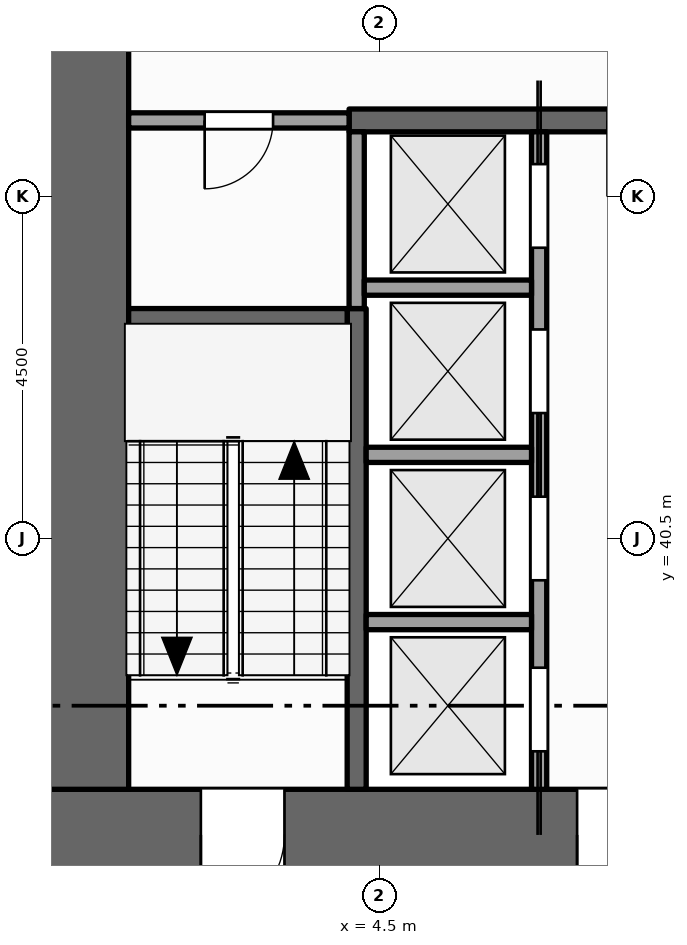
"""IFC4 building model, lengths in metres.
Left out: names, types, materials, properties, quantities, classifications, styles, units other than length and angle.
Written with IfcOpenShell. Run it as: python <this file> out.ifc"""

import sys

from ifc_helpers import new_model, si_unit, direction, frame, frame_2d, origin, place, context, subcontext, project, spatial, rectangle, extrude, element, fill, save


model = new_model("IFC4")
c1 = context("Model", 3, precision=1e-05, world=origin(), true_north=direction((0.0, 1.0)))
c2 = subcontext(c1, "Body", "Model", "MODEL_VIEW")
j1 = project(units=[si_unit("LENGTHUNIT", "METRE"), si_unit("PLANEANGLEUNIT", "RADIAN")], contexts=[c1])
p1 = place(None, origin())
s1 = spatial("IfcSite", under=j1, at=p1, CompositionType="ELEMENT")
p2 = place(p1, origin())
s2 = spatial("IfcBuilding", under=s1, at=p2, CompositionType="ELEMENT")
p3 = place(p2, frame((0.0, 0.0, 61.0)))
s3 = spatial("IfcBuildingStorey", under=s2, at=p3, CompositionType="ELEMENT", Elevation=61.0)
p4 = place(p3, frame((0.0, 36.6, -0.15), z_axis=(0.0, 0.0, 1.0), x_axis=(1.0, 0.0, 0.0)))
e1 = element("IfcWall", 1, at=p4, inside=s3, PredefinedType="SHEAR", context=c2, shape_type="SweptSolid", body=[
    extrude(rectangle(XDim=22.5, YDim=1.2, at=frame_2d((11.25, 0.0))), origin(), (0.0, 0.0, 1.0), 4.0),
])
p5 = place(p4, frame((7.1, 0.0, 0.15)))
e2 = element("IfcOpeningElement", 2, at=p5, cuts=e1, PredefinedType="OPENING", context=c2, shape_type="SweptSolid", body=[
    extrude(rectangle(XDim=1.8, YDim=2.1, at=frame_2d((0.9, 1.05))), frame((0.0, 0.61, 0.0), z_axis=(0.0, -1.0, 0.0), x_axis=(1.0, 0.0, 0.0)), (0.0, 0.0, 1.0), 1.22),
])
p6 = place(p4, frame((13.15, 0.0, 0.15)))
e3 = element("IfcOpeningElement", 3, at=p6, cuts=e1, PredefinedType="OPENING", context=c2, shape_type="SweptSolid", body=[
    extrude(rectangle(XDim=1.1, YDim=2.1, at=frame_2d((0.55, 1.05))), frame((0.0, 0.61, 0.0), z_axis=(0.0, -1.0, 0.0), x_axis=(1.0, 0.0, 0.0)), (0.0, 0.0, 1.0), 1.22),
])
p7 = place(p4, frame((2.15, 0.0, 0.15)))
e4 = element("IfcOpeningElement", 4, at=p7, cuts=e1, PredefinedType="OPENING", context=c2, shape_type="SweptSolid", body=[
    extrude(rectangle(XDim=1.1, YDim=2.1, at=frame_2d((0.55, 1.05))), frame((0.0, 0.61, 0.0), z_axis=(0.0, -1.0, 0.0), x_axis=(1.0, 0.0, 0.0)), (0.0, 0.0, 1.0), 1.22),
])
p8 = place(p4, frame((19.35, 0.0, 0.15)))
e5 = element("IfcOpeningElement", 5, at=p8, cuts=e1, PredefinedType="OPENING", context=c2, shape_type="SweptSolid", body=[
    extrude(rectangle(XDim=1.1, YDim=2.1, at=frame_2d((0.55, 1.05))), frame((0.0, 0.61, 0.0), z_axis=(0.0, -1.0, 0.0), x_axis=(1.0, 0.0, 0.0)), (0.0, 0.0, 1.0), 1.22),
])
p9 = place(p3, frame((0.6, 37.2, -0.15), z_axis=(0.0, 0.0, 1.0), x_axis=(0.0, 1.0, 0.0)))
e6 = element("IfcWall", 6, at=p9, inside=s3, PredefinedType="SHEAR", context=c2, shape_type="SweptSolid", body=[
    extrude(rectangle(XDim=11.1, YDim=1.2, at=frame_2d((5.55, 0.0))), origin(), (0.0, 0.0, 1.0), 4.0),
])
p10 = place(p3, frame((4.2, 37.2, 0.0), z_axis=(0.0, 0.0, 1.0), x_axis=(0.0, 1.0, 0.0)))
e7 = element("IfcWall", 7, at=p10, inside=s3, PredefinedType="SHEAR", context=c2, shape_type="SweptSolid", body=[
    extrude(rectangle(XDim=6.325, YDim=0.25, at=frame_2d((3.163, 0.0))), origin(), (0.0, 0.0, 1.0), 3.85),
])
p11 = place(p3, frame((4.2, 43.525, 0.0), z_axis=(0.0, 0.0, 1.0), x_axis=(0.0, 1.0, 0.0)))
e8 = element("IfcWall", 8, at=p11, inside=s3, PredefinedType="SOLIDWALL", context=c2, shape_type="SweptSolid", body=[
    extrude(rectangle(XDim=2.325, YDim=0.2, at=frame_2d((1.163, 0.0))), origin(), (0.0, 0.0, 1.0), 3.85),
])
p12 = place(p3, frame((6.6, 37.2, 0.0), z_axis=(0.0, 0.0, 1.0), x_axis=(0.0, 1.0, 0.0)))
e9 = element("IfcWall", 9, at=p12, inside=s3, PredefinedType="SOLIDWALL", context=c2, shape_type="SweptSolid", body=[
    extrude(rectangle(XDim=8.65, YDim=0.2, at=frame_2d((4.325, 0.0))), origin(), (0.0, 0.0, 1.0), 3.85),
])
p13 = place(p12, frame((0.5, 0.0, 0.012)))
e10 = element("IfcOpeningElement", 10, at=p13, cuts=e9, PredefinedType="OPENING", context=c2, shape_type="SweptSolid", body=[
    extrude(rectangle(XDim=1.1, YDim=2.1, at=frame_2d((0.55, 1.05))), frame((0.0, 0.11, 0.0), z_axis=(0.0, -1.0, 0.0), x_axis=(1.0, 0.0, 0.0)), (0.0, 0.0, 1.0), 0.22),
])
p14 = place(p12, frame((2.75, 0.0, 0.012)))
e11 = element("IfcOpeningElement", 11, at=p14, cuts=e9, PredefinedType="OPENING", context=c2, shape_type="SweptSolid", body=[
    extrude(rectangle(XDim=1.1, YDim=2.1, at=frame_2d((0.55, 1.05))), frame((0.0, 0.11, 0.0), z_axis=(0.0, -1.0, 0.0), x_axis=(1.0, 0.0, 0.0)), (0.0, 0.0, 1.0), 0.22),
])
p15 = place(p12, frame((4.95, 0.0, 0.012)))
e12 = element("IfcOpeningElement", 12, at=p15, cuts=e9, PredefinedType="OPENING", context=c2, shape_type="SweptSolid", body=[
    extrude(rectangle(XDim=1.1, YDim=2.1, at=frame_2d((0.55, 1.05))), frame((0.0, 0.11, 0.0), z_axis=(0.0, -1.0, 0.0), x_axis=(1.0, 0.0, 0.0)), (0.0, 0.0, 1.0), 0.22),
])
p16 = place(p12, frame((7.125, 0.0, 0.012)))
e13 = element("IfcOpeningElement", 13, at=p16, cuts=e9, PredefinedType="OPENING", context=c2, shape_type="SweptSolid", body=[
    extrude(rectangle(XDim=1.1, YDim=2.1, at=frame_2d((0.55, 1.05))), frame((0.0, 0.11, 0.0), z_axis=(0.0, -1.0, 0.0), x_axis=(1.0, 0.0, 0.0)), (0.0, 0.0, 1.0), 0.22),
])
for number, where, z_axis, x_axis in (
    (14, (4.325, 39.4, 0.0), (0.0, 0.0, 1.0), (1.0, 0.0, 0.0)),
    (15, (4.325, 41.6, 0.0), (0.0, 0.0, 1.0), (1.0, 0.0, 0.0)),
):
    element("IfcWall", number, at=place(p3, frame(where, z_axis=z_axis, x_axis=x_axis)), inside=s3, PredefinedType="SOLIDWALL", context=c2, shape_type="SweptSolid", body=[
        extrude(rectangle(XDim=2.175, YDim=0.2, at=frame_2d((1.087, 0.0))), origin(), (0.0, 0.0, 1.0), 3.85),
    ])
p17 = place(p3, frame((1.2, 43.4, 0.0), z_axis=(0.0, 0.0, 1.0), x_axis=(1.0, 0.0, 0.0)))
e16 = element("IfcWall", 16, at=p17, inside=s3, PredefinedType="SHEAR", context=c2, shape_type="SweptSolid", body=[
    extrude(rectangle(XDim=2.875, YDim=0.25, at=frame_2d((1.438, 0.0))), origin(), (0.0, 0.0, 1.0), 3.85),
])
p18 = place(p3, frame((4.3, 43.8, 0.0), z_axis=(0.0, 0.0, 1.0), x_axis=(1.0, 0.0, 0.0)))
e17 = element("IfcWall", 17, at=p18, inside=s3, PredefinedType="SOLIDWALL", context=c2, shape_type="SweptSolid", body=[
    extrude(rectangle(XDim=2.2, YDim=0.2, at=frame_2d((1.1, 0.0))), origin(), (0.0, 0.0, 1.0), 3.85),
])
p19 = place(p3, frame((1.2, 46.0, 0.0), z_axis=(0.0, 0.0, 1.0), x_axis=(1.0, 0.0, 0.0)))
e18 = element("IfcWall", 18, at=p19, inside=s3, PredefinedType="PARTITIONING", context=c2, shape_type="SweptSolid", body=[
    extrude(rectangle(XDim=2.9, YDim=0.2, at=frame_2d((1.45, 0.0))), origin(), (0.0, 0.0, 1.0), 3.85),
])
p20 = place(p19, frame((1.0, 0.0, 0.0)))
e19 = element("IfcOpeningElement", 19, at=p20, cuts=e18, PredefinedType="OPENING", context=c2, shape_type="SweptSolid", body=[
    extrude(rectangle(XDim=0.9, YDim=2.1, at=frame_2d((0.45, 1.05))), frame((0.0, 0.11, 0.0), z_axis=(0.0, -1.0, 0.0), x_axis=(1.0, 0.0, 0.0)), (0.0, 0.0, 1.0), 0.22),
])
p21 = place(p3, frame((4.1, 46.0, 0.0), z_axis=(0.0, 0.0, 1.0), x_axis=(1.0, 0.0, 0.0)))
e20 = element("IfcWall", 20, at=p21, inside=s3, PredefinedType="SHEAR", context=c2, shape_type="SweptSolid", body=[
    extrude(rectangle(XDim=14.5, YDim=0.3, at=frame_2d((7.25, 0.0))), origin(), (0.0, 0.0, 1.0), 3.85),
])
p22 = place(p21, frame((3.4, 0.0, 0.0)))
e21 = element("IfcOpeningElement", 21, at=p22, cuts=e20, PredefinedType="OPENING", context=c2, shape_type="SweptSolid", body=[
    extrude(rectangle(XDim=1.0, YDim=2.1, at=frame_2d((0.5, 1.05))), frame((0.0, 0.16, 0.0), z_axis=(0.0, -1.0, 0.0), x_axis=(1.0, 0.0, 0.0)), (0.0, 0.0, 1.0), 0.32),
])
p23 = place(p21, frame((9.1, 0.0, 0.0)))
e22 = element("IfcOpeningElement", 22, at=p23, cuts=e20, PredefinedType="OPENING", context=c2, shape_type="SweptSolid", body=[
    extrude(rectangle(XDim=1.0, YDim=2.1, at=frame_2d((0.5, 1.05))), frame((0.0, 0.16, 0.0), z_axis=(0.0, -1.0, 0.0), x_axis=(1.0, 0.0, 0.0)), (0.0, 0.0, 1.0), 0.32),
])
p24 = place(p13, origin())
e23 = element("IfcDoor", 23, at=p24, inside=s3, OperationType="SLIDING_TO_LEFT", PredefinedType="DOOR", context=c2, shape_type="SweptSolid", body=[
    extrude(rectangle(XDim=1.1, YDim=2.1, at=frame_2d((0.55, 1.05))), frame((0.0, 0.025, 0.0), z_axis=(0.0, -1.0, 0.0), x_axis=(1.0, 0.0, 0.0)), (0.0, 0.0, 1.0), 0.05),
])
fill(e10, e23)
p25 = place(p14, origin())
e24 = element("IfcDoor", 24, at=p25, inside=s3, OperationType="SLIDING_TO_RIGHT", PredefinedType="DOOR", context=c2, shape_type="SweptSolid", body=[
    extrude(rectangle(XDim=1.1, YDim=2.1, at=frame_2d((0.55, 1.05))), frame((0.0, 0.025, 0.0), z_axis=(0.0, -1.0, 0.0), x_axis=(1.0, 0.0, 0.0)), (0.0, 0.0, 1.0), 0.05),
])
fill(e11, e24)
p26 = place(p15, origin())
e25 = element("IfcDoor", 25, at=p26, inside=s3, OperationType="SLIDING_TO_LEFT", PredefinedType="DOOR", context=c2, shape_type="SweptSolid", body=[
    extrude(rectangle(XDim=1.1, YDim=2.1, at=frame_2d((0.55, 1.05))), frame((0.0, 0.025, 0.0), z_axis=(0.0, -1.0, 0.0), x_axis=(1.0, 0.0, 0.0)), (0.0, 0.0, 1.0), 0.05),
])
fill(e12, e25)
p27 = place(p16, origin())
e26 = element("IfcDoor", 26, at=p27, inside=s3, OperationType="SLIDING_TO_RIGHT", PredefinedType="DOOR", context=c2, shape_type="SweptSolid", body=[
    extrude(rectangle(XDim=1.1, YDim=2.1, at=frame_2d((0.55, 1.05))), frame((0.0, 0.025, 0.0), z_axis=(0.0, -1.0, 0.0), x_axis=(1.0, 0.0, 0.0)), (0.0, 0.0, 1.0), 0.05),
])
fill(e13, e26)
p28 = place(p5, origin())
e27 = element("IfcDoor", 27, at=p28, inside=s3, OperationType="DOUBLE_DOOR_SINGLE_SWING", PredefinedType="DOOR", context=c2, shape_type="SweptSolid", body=[
    extrude(rectangle(XDim=1.8, YDim=2.1, at=frame_2d((0.9, 1.05))), frame((0.0, 0.025, 0.0), z_axis=(0.0, -1.0, 0.0), x_axis=(1.0, 0.0, 0.0)), (0.0, 0.0, 1.0), 0.05),
])
fill(e2, e27)
p29 = place(p7, origin())
e28 = element("IfcDoor", 28, at=p29, inside=s3, OperationType="SINGLE_SWING_LEFT", PredefinedType="DOOR", context=c2, shape_type="SweptSolid", body=[
    extrude(rectangle(XDim=1.1, YDim=2.1, at=frame_2d((0.55, 1.05))), frame((0.0, 0.025, 0.0), z_axis=(0.0, -1.0, 0.0), x_axis=(1.0, 0.0, 0.0)), (0.0, 0.0, 1.0), 0.05),
])
fill(e4, e28)
p30 = place(p20, origin())
e29 = element("IfcDoor", 29, at=p30, inside=s3, OperationType="SINGLE_SWING_LEFT", PredefinedType="DOOR", context=c2, shape_type="SweptSolid", body=[
    extrude(rectangle(XDim=0.9, YDim=2.1, at=frame_2d((0.45, 1.05))), frame((0.0, 0.025, 0.0), z_axis=(0.0, -1.0, 0.0), x_axis=(1.0, 0.0, 0.0)), (0.0, 0.0, 1.0), 0.05),
])
fill(e19, e29)
save(model, sys.argv[1])
